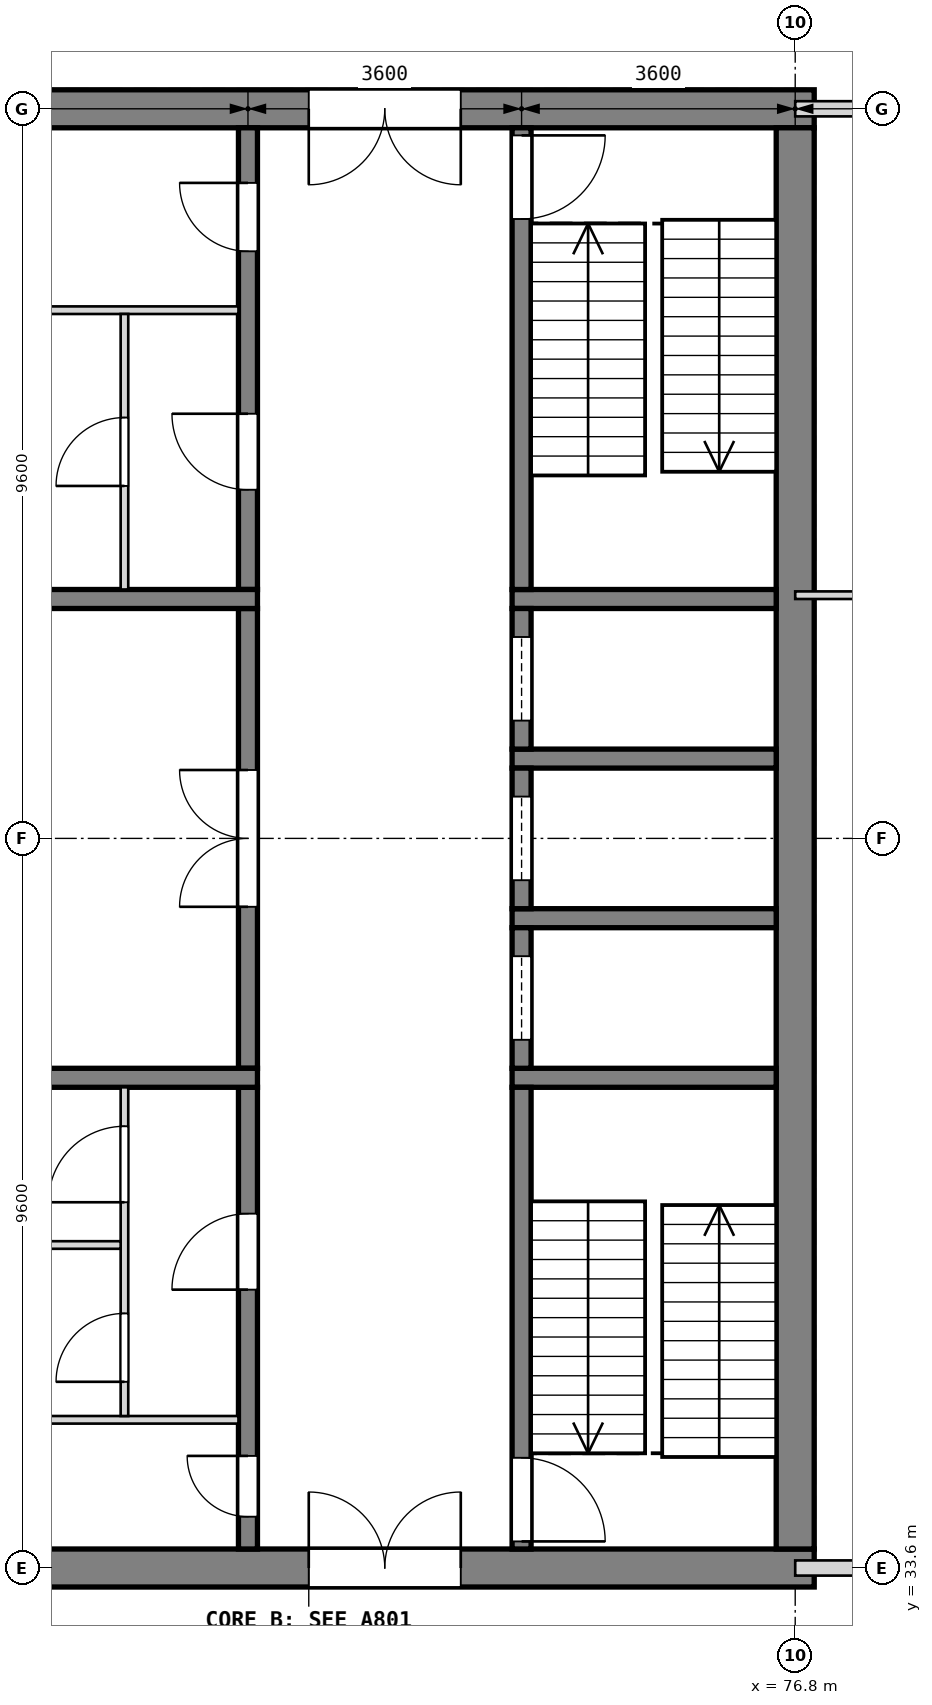
"""IFC4 building model, lengths in metres.
Left out: names, types, materials, properties, quantities, classifications, styles, units other than length and angle.
Written with IfcOpenShell. Run it as: python <this file> out.ifc"""

import sys

from ifc_helpers import new_model, si_unit, direction, frame, frame_2d, origin, place, context, subcontext, project, spatial, rectangle, extrude, element, fill, save


model = new_model("IFC4")
c1 = context("Model", 3, precision=1e-05, world=origin(), true_north=direction((0.0, 1.0)))
c2 = subcontext(c1, "Body", "Model", "MODEL_VIEW")
j1 = project(units=[si_unit("LENGTHUNIT", "METRE"), si_unit("PLANEANGLEUNIT", "RADIAN")], contexts=[c1])
p1 = place(None, origin())
s1 = spatial("IfcSite", under=j1, at=p1, CompositionType="ELEMENT")
p2 = place(p1, origin())
s2 = spatial("IfcBuilding", under=s1, at=p2, CompositionType="ELEMENT")
p3 = place(p2, frame((0.0, 0.0, -4.8)))
s3 = spatial("IfcBuildingStorey", under=s2, at=p3, CompositionType="ELEMENT", Elevation=-4.8)
p4 = place(p3, frame((63.75, 52.8, 0.0), z_axis=(0.0, 0.0, 1.0), x_axis=(1.0, 0.0, 0.0)))
e1 = element("IfcWall", 1, at=p4, inside=s3, PredefinedType="SHEAR", context=c2, shape_type="SweptSolid", body=[
    extrude(rectangle(XDim=13.3, YDim=0.5, at=frame_2d((6.65, 0.0))), origin(), (0.0, 0.0, 1.0), 4.8),
])
p5 = place(p4, frame((6.65, 0.0, 0.0)))
e2 = element("IfcOpeningElement", 2, at=p5, cuts=e1, PredefinedType="OPENING", context=c2, shape_type="SweptSolid", body=[
    extrude(rectangle(XDim=2.0, YDim=2.1, at=frame_2d((1.0, 1.05))), frame((0.0, 0.26, 0.0), z_axis=(0.0, -1.0, 0.0), x_axis=(1.0, 0.0, 0.0)), (0.0, 0.0, 1.0), 0.52),
])
p6 = place(p3, frame((63.75, 33.6, 0.0), z_axis=(0.0, 0.0, 1.0), x_axis=(1.0, 0.0, 0.0)))
e3 = element("IfcWall", 3, at=p6, inside=s3, PredefinedType="SHEAR", context=c2, shape_type="SweptSolid", body=[
    extrude(rectangle(XDim=13.3, YDim=0.5, at=frame_2d((6.65, 0.0))), origin(), (0.0, 0.0, 1.0), 4.8),
])
p7 = place(p6, frame((6.65, 0.0, 0.0)))
e4 = element("IfcOpeningElement", 4, at=p7, cuts=e3, PredefinedType="OPENING", context=c2, shape_type="SweptSolid", body=[
    extrude(rectangle(XDim=2.0, YDim=2.1, at=frame_2d((1.0, 1.05))), frame((0.0, 0.26, 0.0), z_axis=(0.0, -1.0, 0.0), x_axis=(1.0, 0.0, 0.0)), (0.0, 0.0, 1.0), 0.52),
])
p8 = place(p3, frame((76.8, 33.85, 0.0), z_axis=(0.0, 0.0, 1.0), x_axis=(0.0, 1.0, 0.0)))
e5 = element("IfcWall", 5, at=p8, inside=s3, PredefinedType="SHEAR", context=c2, shape_type="SweptSolid", body=[
    extrude(rectangle(XDim=18.7, YDim=0.5, at=frame_2d((9.35, 0.0))), origin(), (0.0, 0.0, 1.0), 4.8),
])
for number, where, z_axis, x_axis in (
    (6, (76.55, 40.05, 0.0), (0.0, 0.0, 1.0), (-1.0, 0.0, 0.0)),
    (7, (76.55, 42.15, 0.0), (0.0, 0.0, 1.0), (-1.0, 0.0, 0.0)),
    (8, (76.55, 44.25, 0.0), (0.0, 0.0, 1.0), (-1.0, 0.0, 0.0)),
    (9, (76.55, 46.35, 0.0), (0.0, 0.0, 1.0), (-1.0, 0.0, 0.0)),
):
    element("IfcWall", number, at=place(p3, frame(where, z_axis=z_axis, x_axis=x_axis)), inside=s3, PredefinedType="SOLIDWALL", context=c2, shape_type="SweptSolid", body=[
        extrude(rectangle(XDim=3.475, YDim=0.25, at=frame_2d((1.738, 0.0))), origin(), (0.0, 0.0, 1.0), 4.5),
    ])
p9 = place(p3, frame((73.2, 33.85, 0.0), z_axis=(0.0, 0.0, 1.0), x_axis=(0.0, 1.0, 0.0)))
e10 = element("IfcWall", 10, at=p9, inside=s3, PredefinedType="SOLIDWALL", context=c2, shape_type="SweptSolid", body=[
    extrude(rectangle(XDim=6.075, YDim=0.25, at=frame_2d((3.038, 0.0))), origin(), (0.0, 0.0, 1.0), 4.5),
])
p10 = place(p9, frame((0.1, 0.0, 0.0)))
e11 = element("IfcOpeningElement", 11, at=p10, cuts=e10, PredefinedType="OPENING", context=c2, shape_type="SweptSolid", body=[
    extrude(rectangle(XDim=1.1, YDim=2.1, at=frame_2d((0.55, 1.05))), frame((0.0, 0.135, 0.0), z_axis=(0.0, -1.0, 0.0), x_axis=(1.0, 0.0, 0.0)), (0.0, 0.0, 1.0), 0.27),
])
p11 = place(p3, frame((73.2, 40.175, 0.0), z_axis=(0.0, 0.0, 1.0), x_axis=(0.0, 1.0, 0.0)))
e12 = element("IfcWall", 12, at=p11, inside=s3, PredefinedType="SOLIDWALL", context=c2, shape_type="SweptSolid", body=[
    extrude(rectangle(XDim=1.85, YDim=0.25, at=frame_2d((0.925, 0.0))), origin(), (0.0, 0.0, 1.0), 4.5),
])
p12 = place(p11, frame((0.375, 0.0, 0.0)))
e13 = element("IfcOpeningElement", 13, at=p12, cuts=e12, PredefinedType="OPENING", context=c2, shape_type="SweptSolid", body=[
    extrude(rectangle(XDim=1.1, YDim=2.1, at=frame_2d((0.55, 1.05))), frame((0.0, 0.135, 0.0), z_axis=(0.0, -1.0, 0.0), x_axis=(1.0, 0.0, 0.0)), (0.0, 0.0, 1.0), 0.27),
])
p13 = place(p3, frame((73.2, 42.275, 0.0), z_axis=(0.0, 0.0, 1.0), x_axis=(0.0, 1.0, 0.0)))
e14 = element("IfcWall", 14, at=p13, inside=s3, PredefinedType="SOLIDWALL", context=c2, shape_type="SweptSolid", body=[
    extrude(rectangle(XDim=1.85, YDim=0.25, at=frame_2d((0.925, 0.0))), origin(), (0.0, 0.0, 1.0), 4.5),
])
p14 = place(p13, frame((0.375, 0.0, 0.0)))
e15 = element("IfcOpeningElement", 15, at=p14, cuts=e14, PredefinedType="OPENING", context=c2, shape_type="SweptSolid", body=[
    extrude(rectangle(XDim=1.1, YDim=2.1, at=frame_2d((0.55, 1.05))), frame((0.0, 0.135, 0.0), z_axis=(0.0, -1.0, 0.0), x_axis=(1.0, 0.0, 0.0)), (0.0, 0.0, 1.0), 0.27),
])
p15 = place(p3, frame((73.2, 44.375, 0.0), z_axis=(0.0, 0.0, 1.0), x_axis=(0.0, 1.0, 0.0)))
e16 = element("IfcWall", 16, at=p15, inside=s3, PredefinedType="SOLIDWALL", context=c2, shape_type="SweptSolid", body=[
    extrude(rectangle(XDim=1.85, YDim=0.25, at=frame_2d((0.925, 0.0))), origin(), (0.0, 0.0, 1.0), 4.5),
])
p16 = place(p15, frame((0.375, 0.0, 0.0)))
e17 = element("IfcOpeningElement", 17, at=p16, cuts=e16, PredefinedType="OPENING", context=c2, shape_type="SweptSolid", body=[
    extrude(rectangle(XDim=1.1, YDim=2.1, at=frame_2d((0.55, 1.05))), frame((0.0, 0.135, 0.0), z_axis=(0.0, -1.0, 0.0), x_axis=(1.0, 0.0, 0.0)), (0.0, 0.0, 1.0), 0.27),
])
p17 = place(p3, frame((73.2, 46.475, 0.0), z_axis=(0.0, 0.0, 1.0), x_axis=(0.0, 1.0, 0.0)))
e18 = element("IfcWall", 18, at=p17, inside=s3, PredefinedType="SOLIDWALL", context=c2, shape_type="SweptSolid", body=[
    extrude(rectangle(XDim=6.075, YDim=0.25, at=frame_2d((3.038, 0.0))), origin(), (0.0, 0.0, 1.0), 4.5),
])
p18 = place(p17, frame((4.875, 0.0, 0.0)))
e19 = element("IfcOpeningElement", 19, at=p18, cuts=e18, PredefinedType="OPENING", context=c2, shape_type="SweptSolid", body=[
    extrude(rectangle(XDim=1.1, YDim=2.1, at=frame_2d((0.55, 1.05))), frame((0.0, 0.135, 0.0), z_axis=(0.0, -1.0, 0.0), x_axis=(1.0, 0.0, 0.0)), (0.0, 0.0, 1.0), 0.27),
])
p19 = place(p3, frame((69.6, 33.85, 0.0), z_axis=(0.0, 0.0, 1.0), x_axis=(0.0, 1.0, 0.0)))
e20 = element("IfcWall", 20, at=p19, inside=s3, PredefinedType="SOLIDWALL", context=c2, shape_type="SweptSolid", body=[
    extrude(rectangle(XDim=6.075, YDim=0.25, at=frame_2d((3.038, 0.0))), origin(), (0.0, 0.0, 1.0), 4.5),
])
p20 = place(p19, frame((0.425, 0.0, 0.0)))
e21 = element("IfcOpeningElement", 21, at=p20, cuts=e20, PredefinedType="OPENING", context=c2, shape_type="SweptSolid", body=[
    extrude(rectangle(XDim=0.8, YDim=2.1, at=frame_2d((0.4, 1.05))), frame((0.0, 0.135, 0.0), z_axis=(0.0, -1.0, 0.0), x_axis=(1.0, 0.0, 0.0)), (0.0, 0.0, 1.0), 0.27),
])
p21 = place(p19, frame((3.413, 0.0, 0.0)))
e22 = element("IfcOpeningElement", 22, at=p21, cuts=e20, PredefinedType="OPENING", context=c2, shape_type="SweptSolid", body=[
    extrude(rectangle(XDim=1.0, YDim=2.1, at=frame_2d((0.5, 1.05))), frame((0.0, 0.135, 0.0), z_axis=(0.0, -1.0, 0.0), x_axis=(1.0, 0.0, 0.0)), (0.0, 0.0, 1.0), 0.27),
])
p22 = place(p3, frame((69.6, 40.175, 0.0), z_axis=(0.0, 0.0, 1.0), x_axis=(0.0, 1.0, 0.0)))
e23 = element("IfcWall", 23, at=p22, inside=s3, PredefinedType="SOLIDWALL", context=c2, shape_type="SweptSolid", body=[
    extrude(rectangle(XDim=6.05, YDim=0.25, at=frame_2d((3.025, 0.0))), origin(), (0.0, 0.0, 1.0), 4.5),
])
p23 = place(p22, frame((2.125, 0.0, 0.0)))
e24 = element("IfcOpeningElement", 24, at=p23, cuts=e23, PredefinedType="OPENING", context=c2, shape_type="SweptSolid", body=[
    extrude(rectangle(XDim=1.8, YDim=2.1, at=frame_2d((0.9, 1.05))), frame((0.0, 0.135, 0.0), z_axis=(0.0, -1.0, 0.0), x_axis=(1.0, 0.0, 0.0)), (0.0, 0.0, 1.0), 0.27),
])
p24 = place(p3, frame((69.6, 46.475, 0.0), z_axis=(0.0, 0.0, 1.0), x_axis=(0.0, 1.0, 0.0)))
e25 = element("IfcWall", 25, at=p24, inside=s3, PredefinedType="SOLIDWALL", context=c2, shape_type="SweptSolid", body=[
    extrude(rectangle(XDim=6.075, YDim=0.25, at=frame_2d((3.038, 0.0))), origin(), (0.0, 0.0, 1.0), 4.5),
])
p25 = place(p24, frame((1.312, 0.0, 0.0)))
e26 = element("IfcOpeningElement", 26, at=p25, cuts=e25, PredefinedType="OPENING", context=c2, shape_type="SweptSolid", body=[
    extrude(rectangle(XDim=1.0, YDim=2.1, at=frame_2d((0.5, 1.05))), frame((0.0, 0.135, 0.0), z_axis=(0.0, -1.0, 0.0), x_axis=(1.0, 0.0, 0.0)), (0.0, 0.0, 1.0), 0.27),
])
p26 = place(p24, frame((4.45, 0.0, 0.0)))
e27 = element("IfcOpeningElement", 27, at=p26, cuts=e25, PredefinedType="OPENING", context=c2, shape_type="SweptSolid", body=[
    extrude(rectangle(XDim=0.9, YDim=2.1, at=frame_2d((0.45, 1.05))), frame((0.0, 0.135, 0.0), z_axis=(0.0, -1.0, 0.0), x_axis=(1.0, 0.0, 0.0)), (0.0, 0.0, 1.0), 0.27),
])
for number, where, z_axis, x_axis in (
    (28, (69.725, 40.05, 0.0), (0.0, 0.0, 1.0), (-1.0, 0.0, 0.0)),
    (29, (69.725, 46.35, 0.0), (0.0, 0.0, 1.0), (-1.0, 0.0, 0.0)),
):
    element("IfcWall", number, at=place(p3, frame(where, z_axis=z_axis, x_axis=x_axis)), inside=s3, PredefinedType="SOLIDWALL", context=c2, shape_type="SweptSolid", body=[
        extrude(rectangle(XDim=5.475, YDim=0.25, at=frame_2d((2.738, 0.0))), origin(), (0.0, 0.0, 1.0), 4.5),
    ])
p27 = place(p3, frame((69.475, 35.55, 0.0), z_axis=(0.0, 0.0, 1.0), x_axis=(-1.0, 0.0, 0.0)))
e30 = element("IfcWall", 30, at=p27, inside=s3, PredefinedType="PARTITIONING", context=c2, shape_type="SweptSolid", body=[
    extrude(rectangle(XDim=5.225, YDim=0.1, at=frame_2d((2.613, 0.0))), origin(), (0.0, 0.0, 1.0), 4.5),
])
p28 = place(p3, frame((67.975, 35.6, 0.0), z_axis=(0.0, 0.0, 1.0), x_axis=(0.0, 1.0, 0.0)))
e31 = element("IfcWall", 31, at=p28, inside=s3, PredefinedType="PARTITIONING", context=c2, shape_type="SweptSolid", body=[
    extrude(rectangle(XDim=4.325, YDim=0.1, at=frame_2d((2.163, 0.0))), origin(), (0.0, 0.0, 1.0), 4.5),
])
p29 = place(p28, frame((0.45, 0.0, 0.0)))
e32 = element("IfcOpeningElement", 32, at=p29, cuts=e31, PredefinedType="OPENING", context=c2, shape_type="SweptSolid", body=[
    extrude(rectangle(XDim=0.9, YDim=2.1, at=frame_2d((0.45, 1.05))), frame((0.0, 0.06, 0.0), z_axis=(0.0, -1.0, 0.0), x_axis=(1.0, 0.0, 0.0)), (0.0, 0.0, 1.0), 0.12),
])
p30 = place(p28, frame((2.812, 0.0, 0.0)))
e33 = element("IfcOpeningElement", 33, at=p30, cuts=e31, PredefinedType="OPENING", context=c2, shape_type="SweptSolid", body=[
    extrude(rectangle(XDim=1.0, YDim=2.1, at=frame_2d((0.5, 1.05))), frame((0.0, 0.06, 0.0), z_axis=(0.0, -1.0, 0.0), x_axis=(1.0, 0.0, 0.0)), (0.0, 0.0, 1.0), 0.12),
])
p31 = place(p3, frame((67.925, 37.85, 0.0), z_axis=(0.0, 0.0, 1.0), x_axis=(-1.0, 0.0, 0.0)))
e34 = element("IfcWall", 34, at=p31, inside=s3, PredefinedType="PARTITIONING", context=c2, shape_type="SweptSolid", body=[
    extrude(rectangle(XDim=3.675, YDim=0.1, at=frame_2d((1.837, 0.0))), origin(), (0.0, 0.0, 1.0), 4.5),
])
p32 = place(p3, frame((69.475, 50.15, 0.0), z_axis=(0.0, 0.0, 1.0), x_axis=(-1.0, 0.0, 0.0)))
e35 = element("IfcWall", 35, at=p32, inside=s3, PredefinedType="PARTITIONING", context=c2, shape_type="SweptSolid", body=[
    extrude(rectangle(XDim=5.225, YDim=0.1, at=frame_2d((2.613, 0.0))), origin(), (0.0, 0.0, 1.0), 4.5),
])
p33 = place(p3, frame((67.975, 46.475, 0.0), z_axis=(0.0, 0.0, 1.0), x_axis=(0.0, 1.0, 0.0)))
e36 = element("IfcWall", 36, at=p33, inside=s3, PredefinedType="PARTITIONING", context=c2, shape_type="SweptSolid", body=[
    extrude(rectangle(XDim=3.625, YDim=0.1, at=frame_2d((1.812, 0.0))), origin(), (0.0, 0.0, 1.0), 4.5),
])
p34 = place(p33, frame((1.363, 0.0, 0.0)))
e37 = element("IfcOpeningElement", 37, at=p34, cuts=e36, PredefinedType="OPENING", context=c2, shape_type="SweptSolid", body=[
    extrude(rectangle(XDim=0.9, YDim=2.1, at=frame_2d((0.45, 1.05))), frame((0.0, 0.06, 0.0), z_axis=(0.0, -1.0, 0.0), x_axis=(1.0, 0.0, 0.0)), (0.0, 0.0, 1.0), 0.12),
])
p35 = place(p3, frame((89.45, 33.6, 0.0), z_axis=(0.0, 0.0, 1.0), x_axis=(-1.0, 0.0, 0.0)))
e38 = element("IfcWall", 38, at=p35, inside=s3, PredefinedType="PARTITIONING", context=c2, shape_type="SweptSolid", body=[
    extrude(rectangle(XDim=12.65, YDim=0.2, at=frame_2d((6.325, 0.0))), origin(), (0.0, 0.0, 1.0), 4.5),
])
p36 = place(p35, frame((5.35, 0.0, 0.0)))
e39 = element("IfcOpeningElement", 39, at=p36, cuts=e38, PredefinedType="OPENING", context=c2, shape_type="SweptSolid", body=[
    extrude(rectangle(XDim=1.8, YDim=2.1, at=frame_2d((0.9, 1.05))), frame((0.0, 0.11, 0.0), z_axis=(0.0, -1.0, 0.0), x_axis=(1.0, 0.0, 0.0)), (0.0, 0.0, 1.0), 0.22),
])
p37 = place(p3, frame((85.05, 46.4, 0.0), z_axis=(0.0, 0.0, 1.0), x_axis=(-1.0, 0.0, 0.0)))
e40 = element("IfcWall", 40, at=p37, inside=s3, PredefinedType="PARTITIONING", context=c2, shape_type="SweptSolid", body=[
    extrude(rectangle(XDim=8.25, YDim=0.1, at=frame_2d((4.125, 0.0))), origin(), (0.0, 0.0, 1.0), 4.5),
])
p38 = place(p3, frame((84.875, 52.8, 0.0), z_axis=(0.0, 0.0, 1.0), x_axis=(-1.0, 0.0, 0.0)))
e41 = element("IfcWall", 41, at=p38, inside=s3, PredefinedType="PARTITIONING", context=c2, shape_type="SweptSolid", body=[
    extrude(rectangle(XDim=8.075, YDim=0.2, at=frame_2d((4.038, 0.0))), origin(), (0.0, 0.0, 1.0), 4.5),
])
p39 = place(p38, frame((3.425, 0.0, 0.0)))
e42 = element("IfcOpeningElement", 42, at=p39, cuts=e41, PredefinedType="OPENING", context=c2, shape_type="SweptSolid", body=[
    extrude(rectangle(XDim=1.1, YDim=2.1, at=frame_2d((0.55, 1.05))), frame((0.0, 0.11, 0.0), z_axis=(0.0, -1.0, 0.0), x_axis=(1.0, 0.0, 0.0)), (0.0, 0.0, 1.0), 0.22),
])
p40 = place(p10, frame((1.1, 0.0, 0.0), z_axis=(0.0, 0.0, 1.0), x_axis=(-1.0, 0.0, 0.0)))
e43 = element("IfcDoor", 43, at=p40, inside=s3, OperationType="SINGLE_SWING_RIGHT", PredefinedType="DOOR", context=c2, shape_type="SweptSolid", body=[
    extrude(rectangle(XDim=1.1, YDim=2.1, at=frame_2d((0.55, 1.05))), frame((0.0, 0.025, 0.0), z_axis=(0.0, -1.0, 0.0), x_axis=(1.0, 0.0, 0.0)), (0.0, 0.0, 1.0), 0.05),
])
fill(e11, e43)
p41 = place(p18, frame((1.1, 0.0, 0.0), z_axis=(0.0, 0.0, 1.0), x_axis=(-1.0, 0.0, 0.0)))
e44 = element("IfcDoor", 44, at=p41, inside=s3, OperationType="SINGLE_SWING_LEFT", PredefinedType="DOOR", context=c2, shape_type="SweptSolid", body=[
    extrude(rectangle(XDim=1.1, YDim=2.1, at=frame_2d((0.55, 1.05))), frame((0.0, 0.025, 0.0), z_axis=(0.0, -1.0, 0.0), x_axis=(1.0, 0.0, 0.0)), (0.0, 0.0, 1.0), 0.05),
])
fill(e19, e44)
p42 = place(p12, origin())
e45 = element("IfcDoor", 45, at=p42, inside=s3, OperationType="SLIDING_TO_LEFT", PredefinedType="DOOR", context=c2, shape_type="SweptSolid", body=[
    extrude(rectangle(XDim=1.1, YDim=2.1, at=frame_2d((0.55, 1.05))), frame((0.0, 0.025, 0.0), z_axis=(0.0, -1.0, 0.0), x_axis=(1.0, 0.0, 0.0)), (0.0, 0.0, 1.0), 0.05),
])
fill(e13, e45)
p43 = place(p14, origin())
e46 = element("IfcDoor", 46, at=p43, inside=s3, OperationType="SLIDING_TO_LEFT", PredefinedType="DOOR", context=c2, shape_type="SweptSolid", body=[
    extrude(rectangle(XDim=1.1, YDim=2.1, at=frame_2d((0.55, 1.05))), frame((0.0, 0.025, 0.0), z_axis=(0.0, -1.0, 0.0), x_axis=(1.0, 0.0, 0.0)), (0.0, 0.0, 1.0), 0.05),
])
fill(e15, e46)
p44 = place(p16, origin())
e47 = element("IfcDoor", 47, at=p44, inside=s3, OperationType="SLIDING_TO_LEFT", PredefinedType="DOOR", context=c2, shape_type="SweptSolid", body=[
    extrude(rectangle(XDim=1.1, YDim=2.1, at=frame_2d((0.55, 1.05))), frame((0.0, 0.025, 0.0), z_axis=(0.0, -1.0, 0.0), x_axis=(1.0, 0.0, 0.0)), (0.0, 0.0, 1.0), 0.05),
])
fill(e17, e47)
p45 = place(p23, origin())
e48 = element("IfcDoor", 48, at=p45, inside=s3, OperationType="DOUBLE_DOOR_SINGLE_SWING", PredefinedType="DOOR", context=c2, shape_type="SweptSolid", body=[
    extrude(rectangle(XDim=1.8, YDim=2.1, at=frame_2d((0.9, 1.05))), frame((0.0, 0.025, 0.0), z_axis=(0.0, -1.0, 0.0), x_axis=(1.0, 0.0, 0.0)), (0.0, 0.0, 1.0), 0.05),
])
fill(e24, e48)
p46 = place(p20, origin())
e49 = element("IfcDoor", 49, at=p46, inside=s3, OperationType="SINGLE_SWING_RIGHT", PredefinedType="DOOR", context=c2, shape_type="SweptSolid", body=[
    extrude(rectangle(XDim=0.8, YDim=2.1, at=frame_2d((0.4, 1.05))), frame((0.0, 0.025, 0.0), z_axis=(0.0, -1.0, 0.0), x_axis=(1.0, 0.0, 0.0)), (0.0, 0.0, 1.0), 0.05),
])
fill(e21, e49)
p47 = place(p21, origin())
e50 = element("IfcDoor", 50, at=p47, inside=s3, OperationType="SINGLE_SWING_LEFT", PredefinedType="DOOR", context=c2, shape_type="SweptSolid", body=[
    extrude(rectangle(XDim=1.0, YDim=2.1, at=frame_2d((0.5, 1.05))), frame((0.0, 0.025, 0.0), z_axis=(0.0, -1.0, 0.0), x_axis=(1.0, 0.0, 0.0)), (0.0, 0.0, 1.0), 0.05),
])
fill(e22, e50)
p48 = place(p29, origin())
e51 = element("IfcDoor", 51, at=p48, inside=s3, OperationType="SINGLE_SWING_LEFT", PredefinedType="DOOR", context=c2, shape_type="SweptSolid", body=[
    extrude(rectangle(XDim=0.9, YDim=2.1, at=frame_2d((0.45, 1.05))), frame((0.0, 0.025, 0.0), z_axis=(0.0, -1.0, 0.0), x_axis=(1.0, 0.0, 0.0)), (0.0, 0.0, 1.0), 0.05),
])
fill(e32, e51)
p49 = place(p30, origin())
e52 = element("IfcDoor", 52, at=p49, inside=s3, OperationType="SINGLE_SWING_LEFT", PredefinedType="DOOR", context=c2, shape_type="SweptSolid", body=[
    extrude(rectangle(XDim=1.0, YDim=2.1, at=frame_2d((0.5, 1.05))), frame((0.0, 0.025, 0.0), z_axis=(0.0, -1.0, 0.0), x_axis=(1.0, 0.0, 0.0)), (0.0, 0.0, 1.0), 0.05),
])
fill(e33, e52)
p50 = place(p25, origin())
e53 = element("IfcDoor", 53, at=p50, inside=s3, OperationType="SINGLE_SWING_RIGHT", PredefinedType="DOOR", context=c2, shape_type="SweptSolid", body=[
    extrude(rectangle(XDim=1.0, YDim=2.1, at=frame_2d((0.5, 1.05))), frame((0.0, 0.025, 0.0), z_axis=(0.0, -1.0, 0.0), x_axis=(1.0, 0.0, 0.0)), (0.0, 0.0, 1.0), 0.05),
])
fill(e26, e53)
p51 = place(p34, origin())
e54 = element("IfcDoor", 54, at=p51, inside=s3, OperationType="SINGLE_SWING_LEFT", PredefinedType="DOOR", context=c2, shape_type="SweptSolid", body=[
    extrude(rectangle(XDim=0.9, YDim=2.1, at=frame_2d((0.45, 1.05))), frame((0.0, 0.025, 0.0), z_axis=(0.0, -1.0, 0.0), x_axis=(1.0, 0.0, 0.0)), (0.0, 0.0, 1.0), 0.05),
])
fill(e37, e54)
p52 = place(p26, origin())
e55 = element("IfcDoor", 55, at=p52, inside=s3, OperationType="SINGLE_SWING_RIGHT", PredefinedType="DOOR", context=c2, shape_type="SweptSolid", body=[
    extrude(rectangle(XDim=0.9, YDim=2.1, at=frame_2d((0.45, 1.05))), frame((0.0, 0.025, 0.0), z_axis=(0.0, -1.0, 0.0), x_axis=(1.0, 0.0, 0.0)), (0.0, 0.0, 1.0), 0.05),
])
fill(e27, e55)
p53 = place(p7, origin())
e56 = element("IfcDoor", 56, at=p53, inside=s3, OperationType="DOUBLE_DOOR_SINGLE_SWING", PredefinedType="DOOR", context=c2, shape_type="SweptSolid", body=[
    extrude(rectangle(XDim=2.0, YDim=2.1, at=frame_2d((1.0, 1.05))), frame((0.0, 0.025, 0.0), z_axis=(0.0, -1.0, 0.0), x_axis=(1.0, 0.0, 0.0)), (0.0, 0.0, 1.0), 0.05),
])
fill(e4, e56)
p54 = place(p5, frame((2.0, 0.0, 0.0), z_axis=(0.0, 0.0, 1.0), x_axis=(-1.0, 0.0, 0.0)))
e57 = element("IfcDoor", 57, at=p54, inside=s3, OperationType="DOUBLE_DOOR_SINGLE_SWING", PredefinedType="DOOR", context=c2, shape_type="SweptSolid", body=[
    extrude(rectangle(XDim=2.0, YDim=2.1, at=frame_2d((1.0, 1.05))), frame((0.0, 0.025, 0.0), z_axis=(0.0, -1.0, 0.0), x_axis=(1.0, 0.0, 0.0)), (0.0, 0.0, 1.0), 0.05),
])
fill(e2, e57)
save(model, sys.argv[1])
